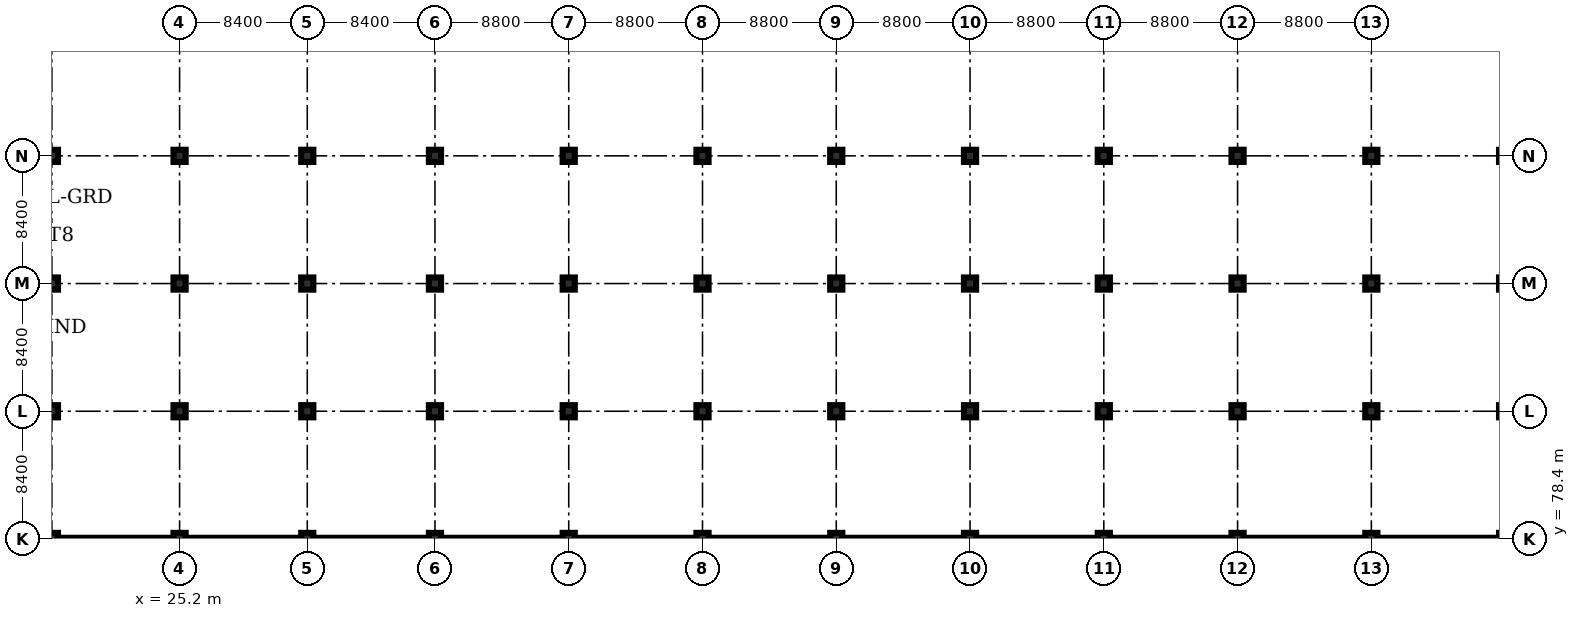
"""IFC4 building model, lengths in metres.
Left out: names, types, materials, properties, quantities, classifications, styles, units other than length and angle.
Written with IfcOpenShell. Run it as: python <this file> out.ifc"""

import sys

from ifc_helpers import new_model, si_unit, direction, frame, frame_2d, origin, origin_2d, place, context, subcontext, project, spatial, rectangle, extrude, element, save


model = new_model("IFC4")
c1 = context("Model", 3, precision=1e-05, world=origin(), true_north=direction((0.0, 1.0)))
c2 = subcontext(c1, "Body", "Model", "MODEL_VIEW")
j1 = project(units=[si_unit("LENGTHUNIT", "METRE"), si_unit("PLANEANGLEUNIT", "RADIAN")], contexts=[c1])
p1 = place(None, origin())
s1 = spatial("IfcSite", under=j1, at=p1, CompositionType="ELEMENT")
p2 = place(p1, origin())
s2 = spatial("IfcBuilding", under=s1, at=p2, CompositionType="ELEMENT")
p3 = place(p2, frame((0.0, 0.0, -4.8)))
s3 = spatial("IfcBuildingStorey", under=s2, at=p3, CompositionType="ELEMENT", Elevation=-4.8)
for number, where, z_axis, x_axis in (
    (1, (16.8, 78.4, 0.0), (0.0, 0.0, 1.0), (1.0, 0.0, 0.0)),
    (2, (16.8, 86.8, 0.0), (0.0, 0.0, 1.0), (1.0, 0.0, 0.0)),
    (3, (16.8, 95.2, 0.0), (0.0, 0.0, 1.0), (1.0, 0.0, 0.0)),
    (4, (16.8, 103.6, 0.0), (0.0, 0.0, 1.0), (1.0, 0.0, 0.0)),
    (5, (25.2, 78.4, 0.0), (0.0, 0.0, 1.0), (1.0, 0.0, 0.0)),
    (6, (25.2, 86.8, 0.0), (0.0, 0.0, 1.0), (1.0, 0.0, 0.0)),
    (7, (25.2, 95.2, 0.0), (0.0, 0.0, 1.0), (1.0, 0.0, 0.0)),
    (8, (25.2, 103.6, 0.0), (0.0, 0.0, 1.0), (1.0, 0.0, 0.0)),
    (9, (33.6, 78.4, 0.0), (0.0, 0.0, 1.0), (1.0, 0.0, 0.0)),
    (10, (33.6, 86.8, 0.0), (0.0, 0.0, 1.0), (1.0, 0.0, 0.0)),
    (11, (33.6, 95.2, 0.0), (0.0, 0.0, 1.0), (1.0, 0.0, 0.0)),
    (12, (33.6, 103.6, 0.0), (0.0, 0.0, 1.0), (1.0, 0.0, 0.0)),
    (13, (42.0, 78.4, 0.0), (0.0, 0.0, 1.0), (1.0, 0.0, 0.0)),
    (14, (42.0, 86.8, 0.0), (0.0, 0.0, 1.0), (1.0, 0.0, 0.0)),
    (15, (42.0, 95.2, 0.0), (0.0, 0.0, 1.0), (1.0, 0.0, 0.0)),
    (16, (42.0, 103.6, 0.0), (0.0, 0.0, 1.0), (1.0, 0.0, 0.0)),
    (17, (50.8, 78.4, 0.0), (0.0, 0.0, 1.0), (1.0, 0.0, 0.0)),
    (18, (50.8, 86.8, 0.0), (0.0, 0.0, 1.0), (1.0, 0.0, 0.0)),
    (19, (50.8, 95.2, 0.0), (0.0, 0.0, 1.0), (1.0, 0.0, 0.0)),
    (20, (50.8, 103.6, 0.0), (0.0, 0.0, 1.0), (1.0, 0.0, 0.0)),
    (21, (59.6, 78.4, 0.0), (0.0, 0.0, 1.0), (1.0, 0.0, 0.0)),
    (22, (59.6, 86.8, 0.0), (0.0, 0.0, 1.0), (1.0, 0.0, 0.0)),
    (23, (59.6, 95.2, 0.0), (0.0, 0.0, 1.0), (1.0, 0.0, 0.0)),
    (24, (59.6, 103.6, 0.0), (0.0, 0.0, 1.0), (1.0, 0.0, 0.0)),
    (25, (68.4, 78.4, 0.0), (0.0, 0.0, 1.0), (1.0, 0.0, 0.0)),
    (26, (68.4, 86.8, 0.0), (0.0, 0.0, 1.0), (1.0, 0.0, 0.0)),
    (27, (68.4, 95.2, 0.0), (0.0, 0.0, 1.0), (1.0, 0.0, 0.0)),
    (28, (68.4, 103.6, 0.0), (0.0, 0.0, 1.0), (1.0, 0.0, 0.0)),
    (29, (77.2, 78.4, 0.0), (0.0, 0.0, 1.0), (1.0, 0.0, 0.0)),
    (30, (77.2, 86.8, 0.0), (0.0, 0.0, 1.0), (1.0, 0.0, 0.0)),
    (31, (77.2, 95.2, 0.0), (0.0, 0.0, 1.0), (1.0, 0.0, 0.0)),
    (32, (77.2, 103.6, 0.0), (0.0, 0.0, 1.0), (1.0, 0.0, 0.0)),
    (33, (86.0, 78.4, 0.0), (0.0, 0.0, 1.0), (1.0, 0.0, 0.0)),
    (34, (86.0, 86.8, 0.0), (0.0, 0.0, 1.0), (1.0, 0.0, 0.0)),
    (35, (86.0, 95.2, 0.0), (0.0, 0.0, 1.0), (1.0, 0.0, 0.0)),
    (36, (86.0, 103.6, 0.0), (0.0, 0.0, 1.0), (1.0, 0.0, 0.0)),
    (37, (94.8, 78.4, 0.0), (0.0, 0.0, 1.0), (1.0, 0.0, 0.0)),
    (38, (94.8, 86.8, 0.0), (0.0, 0.0, 1.0), (1.0, 0.0, 0.0)),
    (39, (94.8, 95.2, 0.0), (0.0, 0.0, 1.0), (1.0, 0.0, 0.0)),
    (40, (94.8, 103.6, 0.0), (0.0, 0.0, 1.0), (1.0, 0.0, 0.0)),
    (41, (103.6, 78.4, 0.0), (0.0, 0.0, 1.0), (1.0, 0.0, 0.0)),
    (42, (103.6, 86.8, 0.0), (0.0, 0.0, 1.0), (1.0, 0.0, 0.0)),
    (43, (103.6, 95.2, 0.0), (0.0, 0.0, 1.0), (1.0, 0.0, 0.0)),
    (44, (103.6, 103.6, 0.0), (0.0, 0.0, 1.0), (1.0, 0.0, 0.0)),
    (45, (112.4, 78.4, 0.0), (0.0, 0.0, 1.0), (1.0, 0.0, 0.0)),
    (46, (112.4, 86.8, 0.0), (0.0, 0.0, 1.0), (1.0, 0.0, 0.0)),
    (47, (112.4, 95.2, 0.0), (0.0, 0.0, 1.0), (1.0, 0.0, 0.0)),
    (48, (112.4, 103.6, 0.0), (0.0, 0.0, 1.0), (1.0, 0.0, 0.0)),
):
    element("IfcColumn", number, at=place(p3, frame(where, z_axis=z_axis, x_axis=x_axis)), inside=s3, PredefinedType="COLUMN", context=c2, shape_type="SweptSolid", body=[
        extrude(rectangle(XDim=0.8, YDim=0.8, at=origin_2d()), origin(), (0.0, 0.0, 1.0), 4.395),
    ])
p4 = place(p3, frame((0.26, 78.25, 0.0), z_axis=(0.0, 0.0, 1.0), x_axis=(1.0, 0.0, 0.0)))
e49 = element("IfcWall", 49, at=p4, inside=s3, PredefinedType="SHEAR", context=c2, shape_type="SweptSolid", body=[
    extrude(rectangle(XDim=138.39, YDim=0.45, at=frame_2d((69.195, 0.0))), origin(), (0.0, 0.0, 1.0), 3.75),
])
save(model, sys.argv[1])
